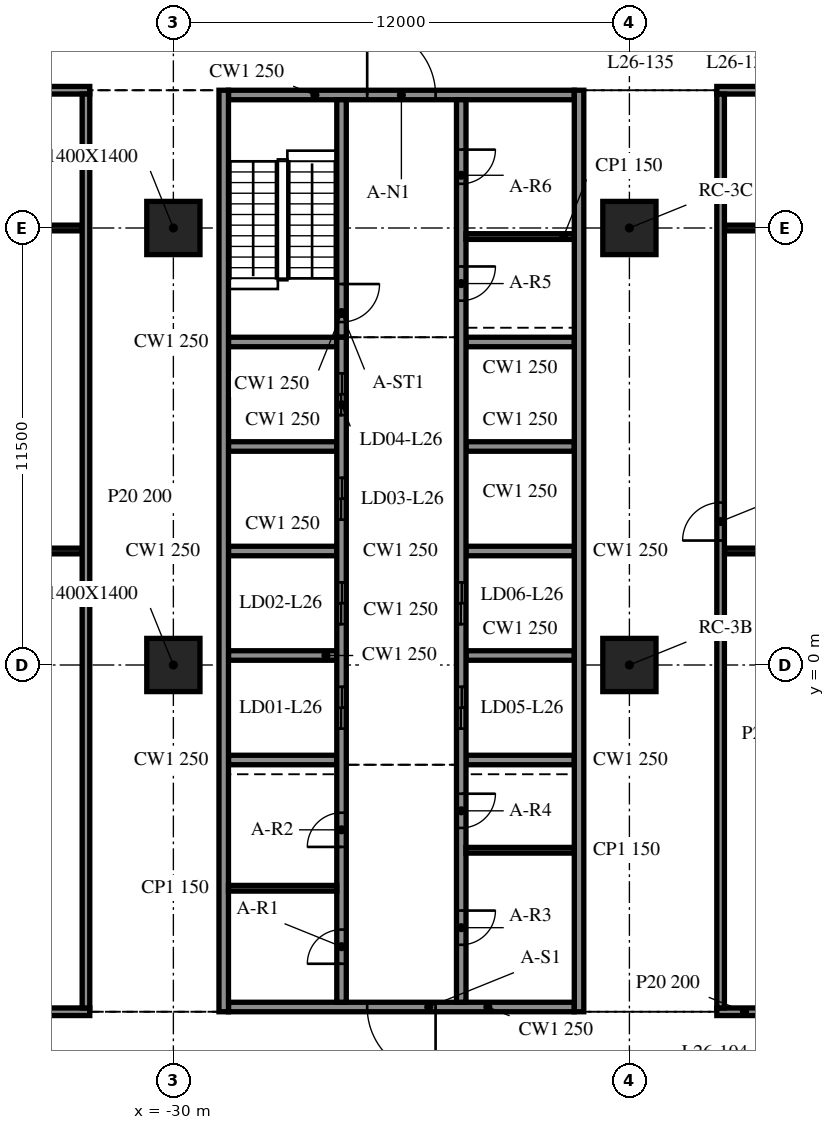
"""IFC4 building model, lengths in metres.
Left out: names, types, materials, properties, quantities, classifications, styles, units other than length and angle.
Written with IfcOpenShell. Run it as: python <this file> out.ifc"""

import sys

from ifc_helpers import new_model, si_unit, direction, frame, frame_2d, origin, origin_2d, place, context, subcontext, project, spatial, rectangle, extrude, element, fill, save


model = new_model("IFC4")
c1 = context("Model", 3, precision=1e-05, world=origin(), true_north=direction((0.0, 1.0)))
c2 = subcontext(c1, "Body", "Model", "MODEL_VIEW")
j1 = project(units=[si_unit("LENGTHUNIT", "METRE"), si_unit("PLANEANGLEUNIT", "RADIAN")], contexts=[c1])
p1 = place(None, origin())
s1 = spatial("IfcSite", under=j1, at=p1, CompositionType="ELEMENT")
p2 = place(p1, origin())
s2 = spatial("IfcBuilding", under=s1, at=p2, CompositionType="ELEMENT")
p3 = place(p2, frame((0.0, 0.0, 113.5)))
s3 = spatial("IfcBuildingStorey", under=s2, at=p3, CompositionType="ELEMENT", Elevation=113.5)
for number, where, z_axis, x_axis in (
    (1, (-30.0, 0.0, -0.34), (0.0, 0.0, 1.0), (1.0, 0.0, 0.0)),
    (2, (-30.0, 11.5, -0.34), (0.0, 0.0, 1.0), (1.0, 0.0, 0.0)),
    (3, (-18.0, 0.0, -0.34), (0.0, 0.0, 1.0), (1.0, 0.0, 0.0)),
    (4, (-18.0, 11.5, -0.34), (0.0, 0.0, 1.0), (1.0, 0.0, 0.0)),
):
    element("IfcColumn", number, at=place(p3, frame(where, z_axis=z_axis, x_axis=x_axis)), inside=s3, PredefinedType="COLUMN", context=c2, shape_type="SweptSolid", body=[
        extrude(rectangle(XDim=1.4, YDim=1.4, at=origin_2d()), origin(), (0.0, 0.0, 1.0), 3.89),
    ])
for number, where, z_axis, x_axis in (
    (5, (-28.675, 15.125, 0.0), (0.0, 0.0, 1.0), (0.0, -1.0, 0.0)),
    (6, (-19.325, -9.125, 0.0), (0.0, 0.0, 1.0), (0.0, 1.0, 0.0)),
):
    element("IfcWall", number, at=place(p3, frame(where, z_axis=z_axis, x_axis=x_axis)), inside=s3, PredefinedType="SOLIDWALL", context=c2, shape_type="SweptSolid", body=[
        extrude(rectangle(XDim=24.25, YDim=0.25, at=frame_2d((12.125, 0.0))), origin(), (0.0, 0.0, 1.0), 3.55),
    ])
p4 = place(p3, frame((-19.45, -9.0, 0.0), z_axis=(0.0, 0.0, 1.0), x_axis=(-1.0, 0.0, 0.0)))
e7 = element("IfcWall", 7, at=p4, inside=s3, PredefinedType="SOLIDWALL", context=c2, shape_type="SweptSolid", body=[
    extrude(rectangle(XDim=9.1, YDim=0.25, at=frame_2d((4.55, 0.0))), origin(), (0.0, 0.0, 1.0), 3.55),
])
p5 = place(p4, frame((3.65, 0.0, 0.0)))
e8 = element("IfcOpeningElement", 8, at=p5, cuts=e7, PredefinedType="OPENING", context=c2, shape_type="SweptSolid", body=[
    extrude(rectangle(XDim=1.8, YDim=2.1, at=frame_2d((0.9, 1.05))), frame((0.0, 0.135, 0.0), z_axis=(0.0, -1.0, 0.0), x_axis=(1.0, 0.0, 0.0)), (0.0, 0.0, 1.0), 0.27),
])
p6 = place(p3, frame((-28.55, 15.0, 0.0), z_axis=(0.0, 0.0, 1.0), x_axis=(1.0, 0.0, 0.0)))
e9 = element("IfcWall", 9, at=p6, inside=s3, PredefinedType="SOLIDWALL", context=c2, shape_type="SweptSolid", body=[
    extrude(rectangle(XDim=9.1, YDim=0.25, at=frame_2d((4.55, 0.0))), origin(), (0.0, 0.0, 1.0), 3.55),
])
p7 = place(p6, frame((3.65, 0.0, 0.0)))
e10 = element("IfcOpeningElement", 10, at=p7, cuts=e9, PredefinedType="OPENING", context=c2, shape_type="SweptSolid", body=[
    extrude(rectangle(XDim=1.8, YDim=2.1, at=frame_2d((0.9, 1.05))), frame((0.0, 0.135, 0.0), z_axis=(0.0, -1.0, 0.0), x_axis=(1.0, 0.0, 0.0)), (0.0, 0.0, 1.0), 0.27),
])
p8 = place(p3, frame((-25.575, -8.875, 0.0), z_axis=(0.0, 0.0, 1.0), x_axis=(0.0, 1.0, 0.0)))
e11 = element("IfcWall", 11, at=p8, inside=s3, PredefinedType="SOLIDWALL", context=c2, shape_type="SweptSolid", body=[
    extrude(rectangle(XDim=17.5, YDim=0.25, at=frame_2d((8.75, 0.0))), origin(), (0.0, 0.0, 1.0), 3.55),
])
p9 = place(p8, frame((7.2, 0.0, 0.0)))
e12 = element("IfcOpeningElement", 12, at=p9, cuts=e11, PredefinedType="OPENING", context=c2, shape_type="SweptSolid", body=[
    extrude(rectangle(XDim=1.1, YDim=2.1, at=frame_2d((0.55, 1.05))), frame((0.0, 0.135, 0.0), z_axis=(0.0, -1.0, 0.0), x_axis=(1.0, 0.0, 0.0)), (0.0, 0.0, 1.0), 0.27),
])
p10 = place(p8, frame((9.95, 0.0, 0.0)))
e13 = element("IfcOpeningElement", 13, at=p10, cuts=e11, PredefinedType="OPENING", context=c2, shape_type="SweptSolid", body=[
    extrude(rectangle(XDim=1.1, YDim=2.1, at=frame_2d((0.55, 1.05))), frame((0.0, 0.135, 0.0), z_axis=(0.0, -1.0, 0.0), x_axis=(1.0, 0.0, 0.0)), (0.0, 0.0, 1.0), 0.27),
])
p11 = place(p8, frame((12.7, 0.0, 0.0)))
e14 = element("IfcOpeningElement", 14, at=p11, cuts=e11, PredefinedType="OPENING", context=c2, shape_type="SweptSolid", body=[
    extrude(rectangle(XDim=1.1, YDim=2.1, at=frame_2d((0.55, 1.05))), frame((0.0, 0.135, 0.0), z_axis=(0.0, -1.0, 0.0), x_axis=(1.0, 0.0, 0.0)), (0.0, 0.0, 1.0), 0.27),
])
p12 = place(p8, frame((15.45, 0.0, 0.0)))
e15 = element("IfcOpeningElement", 15, at=p12, cuts=e11, PredefinedType="OPENING", context=c2, shape_type="SweptSolid", body=[
    extrude(rectangle(XDim=1.1, YDim=2.1, at=frame_2d((0.55, 1.05))), frame((0.0, 0.135, 0.0), z_axis=(0.0, -1.0, 0.0), x_axis=(1.0, 0.0, 0.0)), (0.0, 0.0, 1.0), 0.27),
])
p13 = place(p8, frame((1.012, 0.0, 0.0)))
e16 = element("IfcOpeningElement", 16, at=p13, cuts=e11, PredefinedType="OPENING", context=c2, shape_type="SweptSolid", body=[
    extrude(rectangle(XDim=0.9, YDim=2.1, at=frame_2d((0.45, 1.05))), frame((0.0, 0.135, 0.0), z_axis=(0.0, -1.0, 0.0), x_axis=(1.0, 0.0, 0.0)), (0.0, 0.0, 1.0), 0.27),
])
p14 = place(p8, frame((4.087, 0.0, 0.0)))
e17 = element("IfcOpeningElement", 17, at=p14, cuts=e11, PredefinedType="OPENING", context=c2, shape_type="SweptSolid", body=[
    extrude(rectangle(XDim=0.9, YDim=2.1, at=frame_2d((0.45, 1.05))), frame((0.0, 0.135, 0.0), z_axis=(0.0, -1.0, 0.0), x_axis=(1.0, 0.0, 0.0)), (0.0, 0.0, 1.0), 0.27),
])
p15 = place(p3, frame((-25.575, 14.875, 0.0), z_axis=(0.0, 0.0, 1.0), x_axis=(0.0, -1.0, 0.0)))
e18 = element("IfcWall", 18, at=p15, inside=s3, PredefinedType="SOLIDWALL", context=c2, shape_type="SweptSolid", body=[
    extrude(rectangle(XDim=6.25, YDim=0.25, at=frame_2d((3.125, 0.0))), origin(), (0.0, 0.0, 1.0), 3.55),
])
p16 = place(p15, frame((4.85, 0.0, 0.0)))
e19 = element("IfcOpeningElement", 19, at=p16, cuts=e18, PredefinedType="OPENING", context=c2, shape_type="SweptSolid", body=[
    extrude(rectangle(XDim=1.0, YDim=2.1, at=frame_2d((0.5, 1.05))), frame((0.0, 0.135, 0.0), z_axis=(0.0, -1.0, 0.0), x_axis=(1.0, 0.0, 0.0)), (0.0, 0.0, 1.0), 0.27),
])
p17 = place(p3, frame((-22.425, 14.875, 0.0), z_axis=(0.0, 0.0, 1.0), x_axis=(0.0, -1.0, 0.0)))
e20 = element("IfcWall", 20, at=p17, inside=s3, PredefinedType="SOLIDWALL", context=c2, shape_type="SweptSolid", body=[
    extrude(rectangle(XDim=23.75, YDim=0.25, at=frame_2d((11.875, 0.0))), origin(), (0.0, 0.0, 1.0), 3.55),
])
p18 = place(p17, frame((15.45, 0.0, 0.0)))
e21 = element("IfcOpeningElement", 21, at=p18, cuts=e20, PredefinedType="OPENING", context=c2, shape_type="SweptSolid", body=[
    extrude(rectangle(XDim=1.1, YDim=2.1, at=frame_2d((0.55, 1.05))), frame((0.0, 0.135, 0.0), z_axis=(0.0, -1.0, 0.0), x_axis=(1.0, 0.0, 0.0)), (0.0, 0.0, 1.0), 0.27),
])
p19 = place(p17, frame((12.7, 0.0, 0.0)))
e22 = element("IfcOpeningElement", 22, at=p19, cuts=e20, PredefinedType="OPENING", context=c2, shape_type="SweptSolid", body=[
    extrude(rectangle(XDim=1.1, YDim=2.1, at=frame_2d((0.55, 1.05))), frame((0.0, 0.135, 0.0), z_axis=(0.0, -1.0, 0.0), x_axis=(1.0, 0.0, 0.0)), (0.0, 0.0, 1.0), 0.27),
])
p20 = place(p17, frame((21.337, 0.0, 0.0)))
e23 = element("IfcOpeningElement", 23, at=p20, cuts=e20, PredefinedType="OPENING", context=c2, shape_type="SweptSolid", body=[
    extrude(rectangle(XDim=0.9, YDim=2.1, at=frame_2d((0.45, 1.05))), frame((0.0, 0.135, 0.0), z_axis=(0.0, -1.0, 0.0), x_axis=(1.0, 0.0, 0.0)), (0.0, 0.0, 1.0), 0.27),
])
p21 = place(p17, frame((18.262, 0.0, 0.0)))
e24 = element("IfcOpeningElement", 24, at=p21, cuts=e20, PredefinedType="OPENING", context=c2, shape_type="SweptSolid", body=[
    extrude(rectangle(XDim=0.9, YDim=2.1, at=frame_2d((0.45, 1.05))), frame((0.0, 0.135, 0.0), z_axis=(0.0, -1.0, 0.0), x_axis=(1.0, 0.0, 0.0)), (0.0, 0.0, 1.0), 0.27),
])
p22 = place(p17, frame((4.387, 0.0, 0.0)))
e25 = element("IfcOpeningElement", 25, at=p22, cuts=e20, PredefinedType="OPENING", context=c2, shape_type="SweptSolid", body=[
    extrude(rectangle(XDim=0.9, YDim=2.1, at=frame_2d((0.45, 1.05))), frame((0.0, 0.135, 0.0), z_axis=(0.0, -1.0, 0.0), x_axis=(1.0, 0.0, 0.0)), (0.0, 0.0, 1.0), 0.27),
])
p23 = place(p17, frame((1.312, 0.0, 0.0)))
e26 = element("IfcOpeningElement", 26, at=p23, cuts=e20, PredefinedType="OPENING", context=c2, shape_type="SweptSolid", body=[
    extrude(rectangle(XDim=0.9, YDim=2.1, at=frame_2d((0.45, 1.05))), frame((0.0, 0.135, 0.0), z_axis=(0.0, -1.0, 0.0), x_axis=(1.0, 0.0, 0.0)), (0.0, 0.0, 1.0), 0.27),
])
for number, where, z_axis, x_axis in (
    (27, (-28.55, -2.5, 0.0), (0.0, 0.0, 1.0), (1.0, 0.0, 0.0)),
    (28, (-28.55, 0.25, 0.0), (0.0, 0.0, 1.0), (1.0, 0.0, 0.0)),
    (29, (-28.55, 3.0, 0.0), (0.0, 0.0, 1.0), (1.0, 0.0, 0.0)),
    (30, (-28.55, 5.75, 0.0), (0.0, 0.0, 1.0), (1.0, 0.0, 0.0)),
    (31, (-28.55, 8.5, 0.0), (0.0, 0.0, 1.0), (1.0, 0.0, 0.0)),
    (32, (-22.3, -2.5, 0.0), (0.0, 0.0, 1.0), (1.0, 0.0, 0.0)),
    (33, (-22.3, 0.25, 0.0), (0.0, 0.0, 1.0), (1.0, 0.0, 0.0)),
    (34, (-22.3, 3.0, 0.0), (0.0, 0.0, 1.0), (1.0, 0.0, 0.0)),
    (35, (-22.3, 5.75, 0.0), (0.0, 0.0, 1.0), (1.0, 0.0, 0.0)),
    (36, (-22.3, 8.5, 0.0), (0.0, 0.0, 1.0), (1.0, 0.0, 0.0)),
):
    element("IfcWall", number, at=place(p3, frame(where, z_axis=z_axis, x_axis=x_axis)), inside=s3, PredefinedType="SOLIDWALL", context=c2, shape_type="SweptSolid", body=[
        extrude(rectangle(XDim=2.85, YDim=0.25, at=frame_2d((1.425, 0.0))), origin(), (0.0, 0.0, 1.0), 3.55),
    ])
for number, where, z_axis, x_axis in (
    (37, (-28.55, -5.875, 0.0), (0.0, 0.0, 1.0), (1.0, 0.0, 0.0)),
    (38, (-22.3, -4.875, 0.0), (0.0, 0.0, 1.0), (1.0, 0.0, 0.0)),
    (39, (-22.3, 11.275, 0.0), (0.0, 0.0, 1.0), (1.0, 0.0, 0.0)),
):
    element("IfcWall", number, at=place(p3, frame(where, z_axis=z_axis, x_axis=x_axis)), inside=s3, PredefinedType="PARTITIONING", context=c2, shape_type="SweptSolid", body=[
        extrude(rectangle(XDim=2.85, YDim=0.15, at=frame_2d((1.425, 0.0))), origin(), (0.0, 0.0, 1.0), 3.55),
    ])
p24 = place(p3, frame((-39.95, -9.125, 0.0), z_axis=(0.0, 0.0, 1.0), x_axis=(1.0, 0.0, 0.0)))
e40 = element("IfcWall", 40, at=p24, inside=s3, PredefinedType="PARTITIONING", context=c2, shape_type="SweptSolid", body=[
    extrude(rectangle(XDim=7.75, YDim=0.2, at=frame_2d((3.875, 0.0))), origin(), (0.0, 0.0, 1.0), 3.55),
])
p25 = place(p24, frame((3.3, 0.0, 0.0)))
e41 = element("IfcOpeningElement", 41, at=p25, cuts=e40, PredefinedType="OPENING", context=c2, shape_type="SweptSolid", body=[
    extrude(rectangle(XDim=1.2, YDim=2.1, at=frame_2d((0.6, 1.05))), frame((0.0, 0.11, 0.0), z_axis=(0.0, -1.0, 0.0), x_axis=(1.0, 0.0, 0.0)), (0.0, 0.0, 1.0), 0.22),
])
p26 = place(p3, frame((-15.7, -9.125, 0.0), z_axis=(0.0, 0.0, 1.0), x_axis=(1.0, 0.0, 0.0)))
e42 = element("IfcWall", 42, at=p26, inside=s3, PredefinedType="PARTITIONING", context=c2, shape_type="SweptSolid", body=[
    extrude(rectangle(XDim=7.3, YDim=0.2, at=frame_2d((3.65, 0.0))), origin(), (0.0, 0.0, 1.0), 3.55),
])
p27 = place(p26, frame((3.1, 0.0, 0.0)))
e43 = element("IfcOpeningElement", 43, at=p27, cuts=e42, PredefinedType="OPENING", context=c2, shape_type="SweptSolid", body=[
    extrude(rectangle(XDim=1.2, YDim=2.1, at=frame_2d((0.6, 1.05))), frame((0.0, 0.11, 0.0), z_axis=(0.0, -1.0, 0.0), x_axis=(1.0, 0.0, 0.0)), (0.0, 0.0, 1.0), 0.22),
])
p28 = place(p3, frame((-39.75, 3.0, 0.0), z_axis=(0.0, 0.0, 1.0), x_axis=(1.0, 0.0, 0.0)))
e44 = element("IfcWall", 44, at=p28, inside=s3, PredefinedType="PARTITIONING", context=c2, shape_type="SweptSolid", body=[
    extrude(rectangle(XDim=7.35, YDim=0.15, at=frame_2d((3.675, 0.0))), origin(), (0.0, 0.0, 1.0), 3.55),
])
p29 = place(p3, frame((-15.5, 3.0, 0.0), z_axis=(0.0, 0.0, 1.0), x_axis=(1.0, 0.0, 0.0)))
e45 = element("IfcWall", 45, at=p29, inside=s3, PredefinedType="PARTITIONING", context=c2, shape_type="SweptSolid", body=[
    extrude(rectangle(XDim=6.9, YDim=0.15, at=frame_2d((3.45, 0.0))), origin(), (0.0, 0.0, 1.0), 3.55),
])
p30 = place(p3, frame((-39.75, 11.5, 0.0), z_axis=(0.0, 0.0, 1.0), x_axis=(1.0, 0.0, 0.0)))
e46 = element("IfcWall", 46, at=p30, inside=s3, PredefinedType="PARTITIONING", context=c2, shape_type="SweptSolid", body=[
    extrude(rectangle(XDim=7.35, YDim=0.15, at=frame_2d((3.675, 0.0))), origin(), (0.0, 0.0, 1.0), 2.551),
])
p31 = place(p3, frame((-15.5, 11.5, 0.0), z_axis=(0.0, 0.0, 1.0), x_axis=(1.0, 0.0, 0.0)))
e47 = element("IfcWall", 47, at=p31, inside=s3, PredefinedType="PARTITIONING", context=c2, shape_type="SweptSolid", body=[
    extrude(rectangle(XDim=6.9, YDim=0.15, at=frame_2d((3.45, 0.0))), origin(), (0.0, 0.0, 1.0), 3.55),
])
p32 = place(p3, frame((-39.95, 15.125, 0.0), z_axis=(0.0, 0.0, 1.0), x_axis=(1.0, 0.0, 0.0)))
e48 = element("IfcWall", 48, at=p32, inside=s3, PredefinedType="PARTITIONING", context=c2, shape_type="SweptSolid", body=[
    extrude(rectangle(XDim=7.75, YDim=0.2, at=frame_2d((3.875, 0.0))), origin(), (0.0, 0.0, 1.0), 3.55),
])
p33 = place(p32, frame((3.3, 0.0, 0.0)))
e49 = element("IfcOpeningElement", 49, at=p33, cuts=e48, PredefinedType="OPENING", context=c2, shape_type="SweptSolid", body=[
    extrude(rectangle(XDim=1.2, YDim=2.1, at=frame_2d((0.6, 1.05))), frame((0.0, 0.11, 0.0), z_axis=(0.0, -1.0, 0.0), x_axis=(1.0, 0.0, 0.0)), (0.0, 0.0, 1.0), 0.22),
])
p34 = place(p3, frame((-15.7, 15.125, 0.0), z_axis=(0.0, 0.0, 1.0), x_axis=(1.0, 0.0, 0.0)))
e50 = element("IfcWall", 50, at=p34, inside=s3, PredefinedType="PARTITIONING", context=c2, shape_type="SweptSolid", body=[
    extrude(rectangle(XDim=7.3, YDim=0.2, at=frame_2d((3.65, 0.0))), origin(), (0.0, 0.0, 1.0), 3.55),
])
p35 = place(p34, frame((3.1, 0.0, 0.0)))
e51 = element("IfcOpeningElement", 51, at=p35, cuts=e50, PredefinedType="OPENING", context=c2, shape_type="SweptSolid", body=[
    extrude(rectangle(XDim=1.0, YDim=2.1, at=frame_2d((0.5, 1.05))), frame((0.0, 0.11, 0.0), z_axis=(0.0, -1.0, 0.0), x_axis=(1.0, 0.0, 0.0)), (0.0, 0.0, 1.0), 0.22),
])
p36 = place(p3, frame((-32.3, -9.025, 0.0), z_axis=(0.0, 0.0, 1.0), x_axis=(0.0, 1.0, 0.0)))
e52 = element("IfcWall", 52, at=p36, inside=s3, PredefinedType="PARTITIONING", context=c2, shape_type="SweptSolid", body=[
    extrude(rectangle(XDim=24.05, YDim=0.2, at=frame_2d((12.025, 0.0))), origin(), (0.0, 0.0, 1.0), 3.55),
])
p37 = place(p3, frame((-15.6, -9.025, 0.0), z_axis=(0.0, 0.0, 1.0), x_axis=(0.0, 1.0, 0.0)))
e53 = element("IfcWall", 53, at=p37, inside=s3, PredefinedType="PARTITIONING", context=c2, shape_type="SweptSolid", body=[
    extrude(rectangle(XDim=24.05, YDim=0.2, at=frame_2d((12.025, 0.0))), origin(), (0.0, 0.0, 1.0), 3.55),
])
p38 = place(p37, frame((12.3, 0.0, 0.0)))
e54 = element("IfcOpeningElement", 54, at=p38, cuts=e53, PredefinedType="OPENING", context=c2, shape_type="SweptSolid", body=[
    extrude(rectangle(XDim=1.0, YDim=2.1, at=frame_2d((0.5, 1.05))), frame((0.0, 0.11, 0.0), z_axis=(0.0, -1.0, 0.0), x_axis=(1.0, 0.0, 0.0)), (0.0, 0.0, 1.0), 0.22),
])
p39 = place(p5, origin())
e55 = element("IfcDoor", 55, at=p39, inside=s3, OperationType="DOUBLE_DOOR_SINGLE_SWING", PredefinedType="DOOR", context=c2, shape_type="SweptSolid", body=[
    extrude(rectangle(XDim=1.8, YDim=2.1, at=frame_2d((0.9, 1.05))), frame((0.0, 0.025, 0.0), z_axis=(0.0, -1.0, 0.0), x_axis=(1.0, 0.0, 0.0)), (0.0, 0.0, 1.0), 0.05),
])
fill(e8, e55)
p40 = place(p7, origin())
e56 = element("IfcDoor", 56, at=p40, inside=s3, OperationType="DOUBLE_DOOR_SINGLE_SWING", PredefinedType="DOOR", context=c2, shape_type="SweptSolid", body=[
    extrude(rectangle(XDim=1.8, YDim=2.1, at=frame_2d((0.9, 1.05))), frame((0.0, 0.025, 0.0), z_axis=(0.0, -1.0, 0.0), x_axis=(1.0, 0.0, 0.0)), (0.0, 0.0, 1.0), 0.05),
])
fill(e10, e56)
p41 = place(p18, origin())
e57 = element("IfcDoor", 57, at=p41, inside=s3, OperationType="DOUBLE_DOOR_SLIDING", PredefinedType="DOOR", context=c2, shape_type="SweptSolid", body=[
    extrude(rectangle(XDim=1.1, YDim=2.1, at=frame_2d((0.55, 1.05))), frame((0.0, 0.025, 0.0), z_axis=(0.0, -1.0, 0.0), x_axis=(1.0, 0.0, 0.0)), (0.0, 0.0, 1.0), 0.05),
])
fill(e21, e57)
p42 = place(p19, origin())
e58 = element("IfcDoor", 58, at=p42, inside=s3, OperationType="DOUBLE_DOOR_SLIDING", PredefinedType="DOOR", context=c2, shape_type="SweptSolid", body=[
    extrude(rectangle(XDim=1.1, YDim=2.1, at=frame_2d((0.55, 1.05))), frame((0.0, 0.025, 0.0), z_axis=(0.0, -1.0, 0.0), x_axis=(1.0, 0.0, 0.0)), (0.0, 0.0, 1.0), 0.05),
])
fill(e22, e58)
p43 = place(p9, origin())
e59 = element("IfcDoor", 59, at=p43, inside=s3, OperationType="DOUBLE_DOOR_SLIDING", PredefinedType="DOOR", context=c2, shape_type="SweptSolid", body=[
    extrude(rectangle(XDim=1.1, YDim=2.1, at=frame_2d((0.55, 1.05))), frame((0.0, 0.025, 0.0), z_axis=(0.0, -1.0, 0.0), x_axis=(1.0, 0.0, 0.0)), (0.0, 0.0, 1.0), 0.05),
])
fill(e12, e59)
p44 = place(p10, origin())
e60 = element("IfcDoor", 60, at=p44, inside=s3, OperationType="DOUBLE_DOOR_SLIDING", PredefinedType="DOOR", context=c2, shape_type="SweptSolid", body=[
    extrude(rectangle(XDim=1.1, YDim=2.1, at=frame_2d((0.55, 1.05))), frame((0.0, 0.025, 0.0), z_axis=(0.0, -1.0, 0.0), x_axis=(1.0, 0.0, 0.0)), (0.0, 0.0, 1.0), 0.05),
])
fill(e13, e60)
p45 = place(p11, origin())
e61 = element("IfcDoor", 61, at=p45, inside=s3, OperationType="DOUBLE_DOOR_SLIDING", PredefinedType="DOOR", context=c2, shape_type="SweptSolid", body=[
    extrude(rectangle(XDim=1.1, YDim=2.1, at=frame_2d((0.55, 1.05))), frame((0.0, 0.025, 0.0), z_axis=(0.0, -1.0, 0.0), x_axis=(1.0, 0.0, 0.0)), (0.0, 0.0, 1.0), 0.05),
])
fill(e14, e61)
p46 = place(p12, origin())
e62 = element("IfcDoor", 62, at=p46, inside=s3, OperationType="DOUBLE_DOOR_SLIDING", PredefinedType="DOOR", context=c2, shape_type="SweptSolid", body=[
    extrude(rectangle(XDim=1.1, YDim=2.1, at=frame_2d((0.55, 1.05))), frame((0.0, 0.025, 0.0), z_axis=(0.0, -1.0, 0.0), x_axis=(1.0, 0.0, 0.0)), (0.0, 0.0, 1.0), 0.05),
])
fill(e15, e62)
p47 = place(p13, origin())
e63 = element("IfcDoor", 63, at=p47, inside=s3, OperationType="SINGLE_SWING_LEFT", PredefinedType="DOOR", context=c2, shape_type="SweptSolid", body=[
    extrude(rectangle(XDim=0.9, YDim=2.1, at=frame_2d((0.45, 1.05))), frame((0.0, 0.025, 0.0), z_axis=(0.0, -1.0, 0.0), x_axis=(1.0, 0.0, 0.0)), (0.0, 0.0, 1.0), 0.05),
])
fill(e16, e63)
p48 = place(p14, origin())
e64 = element("IfcDoor", 64, at=p48, inside=s3, OperationType="SINGLE_SWING_RIGHT", PredefinedType="DOOR", context=c2, shape_type="SweptSolid", body=[
    extrude(rectangle(XDim=0.9, YDim=2.1, at=frame_2d((0.45, 1.05))), frame((0.0, 0.025, 0.0), z_axis=(0.0, -1.0, 0.0), x_axis=(1.0, 0.0, 0.0)), (0.0, 0.0, 1.0), 0.05),
])
fill(e17, e64)
p49 = place(p20, origin())
e65 = element("IfcDoor", 65, at=p49, inside=s3, OperationType="SINGLE_SWING_LEFT", PredefinedType="DOOR", context=c2, shape_type="SweptSolid", body=[
    extrude(rectangle(XDim=0.9, YDim=2.1, at=frame_2d((0.45, 1.05))), frame((0.0, 0.025, 0.0), z_axis=(0.0, -1.0, 0.0), x_axis=(1.0, 0.0, 0.0)), (0.0, 0.0, 1.0), 0.05),
])
fill(e23, e65)
p50 = place(p21, origin())
e66 = element("IfcDoor", 66, at=p50, inside=s3, OperationType="SINGLE_SWING_RIGHT", PredefinedType="DOOR", context=c2, shape_type="SweptSolid", body=[
    extrude(rectangle(XDim=0.9, YDim=2.1, at=frame_2d((0.45, 1.05))), frame((0.0, 0.025, 0.0), z_axis=(0.0, -1.0, 0.0), x_axis=(1.0, 0.0, 0.0)), (0.0, 0.0, 1.0), 0.05),
])
fill(e24, e66)
p51 = place(p22, origin())
e67 = element("IfcDoor", 67, at=p51, inside=s3, OperationType="SINGLE_SWING_LEFT", PredefinedType="DOOR", context=c2, shape_type="SweptSolid", body=[
    extrude(rectangle(XDim=0.9, YDim=2.1, at=frame_2d((0.45, 1.05))), frame((0.0, 0.025, 0.0), z_axis=(0.0, -1.0, 0.0), x_axis=(1.0, 0.0, 0.0)), (0.0, 0.0, 1.0), 0.05),
])
fill(e25, e67)
p52 = place(p23, origin())
e68 = element("IfcDoor", 68, at=p52, inside=s3, OperationType="SINGLE_SWING_RIGHT", PredefinedType="DOOR", context=c2, shape_type="SweptSolid", body=[
    extrude(rectangle(XDim=0.9, YDim=2.1, at=frame_2d((0.45, 1.05))), frame((0.0, 0.025, 0.0), z_axis=(0.0, -1.0, 0.0), x_axis=(1.0, 0.0, 0.0)), (0.0, 0.0, 1.0), 0.05),
])
fill(e26, e68)
p53 = place(p16, origin())
e69 = element("IfcDoor", 69, at=p53, inside=s3, OperationType="SINGLE_SWING_LEFT", PredefinedType="DOOR", context=c2, shape_type="SweptSolid", body=[
    extrude(rectangle(XDim=1.0, YDim=2.1, at=frame_2d((0.5, 1.05))), frame((0.0, 0.025, 0.0), z_axis=(0.0, -1.0, 0.0), x_axis=(1.0, 0.0, 0.0)), (0.0, 0.0, 1.0), 0.05),
])
fill(e19, e69)
p54 = place(p38, origin())
e70 = element("IfcDoor", 70, at=p54, inside=s3, OperationType="SINGLE_SWING_LEFT", PredefinedType="DOOR", context=c2, shape_type="SweptSolid", body=[
    extrude(rectangle(XDim=1.0, YDim=2.1, at=frame_2d((0.5, 1.05))), frame((0.0, 0.025, 0.0), z_axis=(0.0, -1.0, 0.0), x_axis=(1.0, 0.0, 0.0)), (0.0, 0.0, 1.0), 0.05),
])
fill(e54, e70)
save(model, sys.argv[1])
